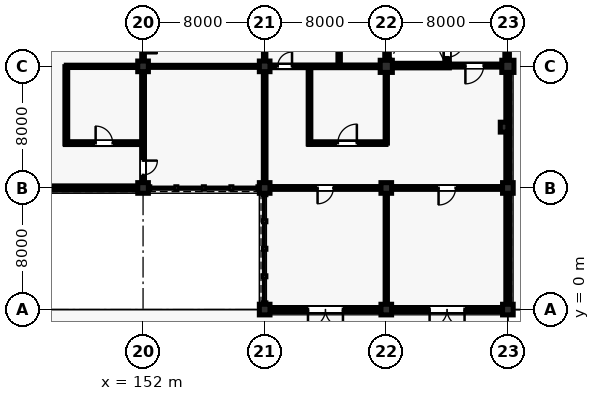
"""IFC4 building model, lengths in metres.
Left out: names, types, materials, properties, quantities, classifications, styles, units other than length and angle.
Written with IfcOpenShell. Run it as: python <this file> out.ifc"""

import sys

from ifc_helpers import new_model, si_unit, direction, frame, frame_2d, origin, origin_2d, place, context, subcontext, project, spatial, rectangle, extrude, element, fill, save


model = new_model("IFC4")
c1 = context("Model", 3, precision=1e-05, world=origin(), true_north=direction((0.0, 1.0)))
c2 = subcontext(c1, "Body", "Model", "MODEL_VIEW")
j1 = project(units=[si_unit("LENGTHUNIT", "METRE"), si_unit("PLANEANGLEUNIT", "RADIAN")], contexts=[c1])
p1 = place(None, origin())
s1 = spatial("IfcSite", under=j1, at=p1, CompositionType="ELEMENT")
p2 = place(p1, origin())
s2 = spatial("IfcBuilding", under=s1, at=p2, CompositionType="ELEMENT")
p3 = place(p2, origin())
s3 = spatial("IfcBuildingStorey", under=s2, at=p3, CompositionType="ELEMENT", Elevation=0.0)
for number, where, z_axis, x_axis in (
    (1, (152.0, 8.0, 0.0), (0.0, 0.0, 1.0), (1.0, 0.0, 0.0)),
    (2, (152.0, 16.0, 0.0), (0.0, 0.0, 1.0), (1.0, 0.0, 0.0)),
    (3, (160.0, 0.0, 0.0), (0.0, 0.0, 1.0), (1.0, 0.0, 0.0)),
    (4, (160.0, 8.0, 0.0), (0.0, 0.0, 1.0), (1.0, 0.0, 0.0)),
    (5, (160.0, 16.0, 0.0), (0.0, 0.0, 1.0), (1.0, 0.0, 0.0)),
    (6, (168.0, 0.0, 0.0), (0.0, 0.0, 1.0), (1.0, 0.0, 0.0)),
    (7, (168.0, 8.0, 0.0), (0.0, 0.0, 1.0), (1.0, 0.0, 0.0)),
):
    element("IfcColumn", number, at=place(p3, frame(where, z_axis=z_axis, x_axis=x_axis)), inside=s3, PredefinedType="COLUMN", context=c2, shape_type="SweptSolid", body=[
        extrude(rectangle(XDim=0.7, YDim=0.7, at=origin_2d()), origin(), (0.0, 0.0, 1.0), 5.28),
    ])
p4 = place(p3, frame((168.0, 16.0, 0.0), z_axis=(0.0, 0.0, 1.0), x_axis=(1.0, 0.0, 0.0)))
e8 = element("IfcColumn", 8, at=p4, inside=s3, PredefinedType="COLUMN", context=c2, shape_type="SweptSolid", body=[
    extrude(rectangle(XDim=0.8, YDim=0.8, at=origin_2d()), origin(), (0.0, 0.0, 1.0), 5.28),
])
for number, where, z_axis, x_axis in (
    (9, (176.0, 0.0, 0.0), (0.0, 0.0, 1.0), (1.0, 0.0, 0.0)),
    (10, (176.0, 8.0, 0.0), (0.0, 0.0, 1.0), (1.0, 0.0, 0.0)),
):
    element("IfcColumn", number, at=place(p3, frame(where, z_axis=z_axis, x_axis=x_axis)), inside=s3, PredefinedType="COLUMN", context=c2, shape_type="SweptSolid", body=[
        extrude(rectangle(XDim=0.7, YDim=0.7, at=origin_2d()), origin(), (0.0, 0.0, 1.0), 5.28),
    ])
p5 = place(p3, frame((176.0, 16.0, 0.0), z_axis=(0.0, 0.0, 1.0), x_axis=(1.0, 0.0, 0.0)))
e11 = element("IfcColumn", 11, at=p5, inside=s3, PredefinedType="COLUMN", context=c2, shape_type="SweptSolid", body=[
    extrude(rectangle(XDim=0.8, YDim=0.8, at=origin_2d()), origin(), (0.0, 0.0, 1.0), 5.28),
])
p6 = place(p3, frame((175.75, 12.0, 0.0), z_axis=(0.0, 0.0, 1.0), x_axis=(1.0, 0.0, 0.0)))
e12 = element("IfcColumn", 12, at=p6, inside=s3, PredefinedType="PILASTER", context=c2, shape_type="SweptSolid", body=[
    extrude(rectangle(XDim=0.5, YDim=0.65, at=origin_2d()), origin(), (0.0, 0.0, 1.0), 5.28),
])
p7 = place(p3, frame((144.335, 8.0, 0.0), z_axis=(0.0, 0.0, 1.0), x_axis=(1.0, 0.0, 0.0)))
e13 = element("IfcWall", 13, at=p7, inside=s3, PredefinedType="SOLIDWALL", context=c2, shape_type="SweptSolid", body=[
    extrude(rectangle(XDim=7.33, YDim=0.27, at=frame_2d((3.665, 0.0))), origin(), (0.0, 0.0, 1.0), 4.677),
])
p8 = place(p7, frame((0.644, 0.0, 0.95)))
e14 = element("IfcOpeningElement", 14, at=p8, cuts=e13, PredefinedType="OPENING", context=c2, shape_type="SweptSolid", body=[
    extrude(rectangle(XDim=1.35, YDim=1.9, at=frame_2d((0.675, 0.95))), frame((0.0, 0.145, 0.0), z_axis=(0.0, -1.0, 0.0), x_axis=(1.0, 0.0, 0.0)), (0.0, 0.0, 1.0), 0.29),
])
p9 = place(p7, frame((5.336, 0.0, 0.95)))
e15 = element("IfcOpeningElement", 15, at=p9, cuts=e13, PredefinedType="OPENING", context=c2, shape_type="SweptSolid", body=[
    extrude(rectangle(XDim=1.35, YDim=1.9, at=frame_2d((0.675, 0.95))), frame((0.0, 0.145, 0.0), z_axis=(0.0, -1.0, 0.0), x_axis=(1.0, 0.0, 0.0)), (0.0, 0.0, 1.0), 0.29),
])
p10 = place(p3, frame((160.335, 0.0, 0.0), z_axis=(0.0, 0.0, 1.0), x_axis=(1.0, 0.0, 0.0)))
e16 = element("IfcWall", 16, at=p10, inside=s3, PredefinedType="SOLIDWALL", context=c2, shape_type="SweptSolid", body=[
    extrude(rectangle(XDim=7.33, YDim=0.27, at=frame_2d((3.665, 0.0))), origin(), (0.0, 0.0, 1.0), 4.61),
])
p11 = place(p10, frame((2.515, 0.0, 0.0)))
e17 = element("IfcOpeningElement", 17, at=p11, cuts=e16, PredefinedType="OPENING", context=c2, shape_type="SweptSolid", body=[
    extrude(rectangle(XDim=2.3, YDim=2.55, at=frame_2d((1.15, 1.275))), frame((0.0, 0.145, 0.0), z_axis=(0.0, -1.0, 0.0), x_axis=(1.0, 0.0, 0.0)), (0.0, 0.0, 1.0), 0.29),
])
p12 = place(p3, frame((168.335, 0.0, 0.0), z_axis=(0.0, 0.0, 1.0), x_axis=(1.0, 0.0, 0.0)))
e18 = element("IfcWall", 18, at=p12, inside=s3, PredefinedType="SOLIDWALL", context=c2, shape_type="SweptSolid", body=[
    extrude(rectangle(XDim=7.33, YDim=0.27, at=frame_2d((3.665, 0.0))), origin(), (0.0, 0.0, 1.0), 4.674),
])
p13 = place(p12, frame((2.515, 0.0, 0.0)))
e19 = element("IfcOpeningElement", 19, at=p13, cuts=e18, PredefinedType="OPENING", context=c2, shape_type="SweptSolid", body=[
    extrude(rectangle(XDim=2.3, YDim=2.55, at=frame_2d((1.15, 1.275))), frame((0.0, 0.145, 0.0), z_axis=(0.0, -1.0, 0.0), x_axis=(1.0, 0.0, 0.0)), (0.0, 0.0, 1.0), 0.29),
])
p14 = place(p3, frame((176.0, 0.335, 0.0), z_axis=(0.0, 0.0, 1.0), x_axis=(0.0, 1.0, 0.0)))
e20 = element("IfcWall", 20, at=p14, inside=s3, PredefinedType="SOLIDWALL", context=c2, shape_type="SweptSolid", body=[
    extrude(rectangle(XDim=7.33, YDim=0.27, at=frame_2d((3.665, 0.0))), origin(), (0.0, 0.0, 1.0), 4.614),
])
p15 = place(p14, frame((2.59, 0.0, 0.9)))
e21 = element("IfcOpeningElement", 21, at=p15, cuts=e20, PredefinedType="OPENING", context=c2, shape_type="SweptSolid", body=[
    extrude(rectangle(XDim=2.15, YDim=2.8, at=frame_2d((1.075, 1.4))), frame((0.0, 0.145, 0.0), z_axis=(0.0, -1.0, 0.0), x_axis=(1.0, 0.0, 0.0)), (0.0, 0.0, 1.0), 0.29),
])
p16 = place(p3, frame((176.0, 8.335, 0.0), z_axis=(0.0, 0.0, 1.0), x_axis=(0.0, 1.0, 0.0)))
e22 = element("IfcWall", 22, at=p16, inside=s3, PredefinedType="SOLIDWALL", context=c2, shape_type="SweptSolid", body=[
    extrude(rectangle(XDim=7.28, YDim=0.27, at=frame_2d((3.64, 0.0))), origin(), (0.0, 0.0, 1.0), 4.677),
])
p17 = place(p16, frame((4.25, 0.0, 0.9)))
e23 = element("IfcOpeningElement", 23, at=p17, cuts=e22, PredefinedType="OPENING", context=c2, shape_type="SweptSolid", body=[
    extrude(rectangle(XDim=1.85, YDim=2.65, at=frame_2d((0.925, 1.325))), frame((0.0, 0.145, 0.0), z_axis=(0.0, -1.0, 0.0), x_axis=(1.0, 0.0, 0.0)), (0.0, 0.0, 1.0), 0.29),
])
for number, where, z_axis, x_axis in (
    (24, (168.05, 16.29, 0.0), (0.0, 0.0, 1.0), (0.0, 1.0, 0.0)),
    (25, (175.95, 16.29, 0.0), (0.0, 0.0, 1.0), (0.0, 1.0, 0.0)),
):
    element("IfcWall", number, at=place(p3, frame(where, z_axis=z_axis, x_axis=x_axis)), inside=s3, PredefinedType="SHEAR", context=c2, shape_type="SweptSolid", body=[
        extrude(rectangle(XDim=7.42, YDim=0.3, at=frame_2d((3.71, 0.0))), origin(), (0.0, 0.0, 1.0), 5.035),
    ])
p18 = place(p3, frame((168.29, 16.05, 0.0), z_axis=(0.0, 0.0, 1.0), x_axis=(1.0, 0.0, 0.0)))
e26 = element("IfcWall", 26, at=p18, inside=s3, PredefinedType="SHEAR", context=c2, shape_type="SweptSolid", body=[
    extrude(rectangle(XDim=3.86, YDim=0.3, at=frame_2d((1.93, 0.0))), origin(), (0.0, 0.0, 1.0), 5.035),
])
p19 = place(p3, frame((172.0, 16.05, 0.0), z_axis=(0.0, 0.0, 1.0), x_axis=(0.0, 1.0, 0.0)))
e27 = element("IfcWall", 27, at=p19, inside=s3, PredefinedType="SHEAR", context=c2, shape_type="SweptSolid", body=[
    extrude(rectangle(XDim=7.9, YDim=0.3, at=frame_2d((3.95, 0.0))), origin(), (0.0, 0.0, 1.0), 5.035),
])
p20 = place(p19, frame((0.55, 0.0, 0.0)))
e28 = element("IfcOpeningElement", 28, at=p20, cuts=e27, PredefinedType="OPENING", context=c2, shape_type="SweptSolid", body=[
    extrude(rectangle(XDim=1.1, YDim=2.15, at=frame_2d((0.55, 1.075))), frame((0.0, 0.16, 0.0), z_axis=(0.0, -1.0, 0.0), x_axis=(1.0, 0.0, 0.0)), (0.0, 0.0, 1.0), 0.32),
])
p21 = place(p3, frame((172.0, 16.05, 0.0), z_axis=(0.0, 0.0, 1.0), x_axis=(1.0, 0.0, 0.0)))
e29 = element("IfcWall", 29, at=p21, inside=s3, PredefinedType="PARTITIONING", context=c2, shape_type="SweptSolid", body=[
    extrude(rectangle(XDim=3.61, YDim=0.2, at=frame_2d((1.805, 0.0))), origin(), (0.0, 0.0, 1.0), 4.404),
])
p22 = place(p21, frame((1.205, 0.0, 0.0)))
e30 = element("IfcOpeningElement", 30, at=p22, cuts=e29, PredefinedType="OPENING", context=c2, shape_type="SweptSolid", body=[
    extrude(rectangle(XDim=1.2, YDim=2.15, at=frame_2d((0.6, 1.075))), frame((0.0, 0.11, 0.0), z_axis=(0.0, -1.0, 0.0), x_axis=(1.0, 0.0, 0.0)), (0.0, 0.0, 1.0), 0.22),
])
p23 = place(p3, frame((146.9, 10.95, 0.0), z_axis=(0.0, 0.0, 1.0), x_axis=(1.0, 0.0, 0.0)))
e31 = element("IfcWall", 31, at=p23, inside=s3, PredefinedType="PARTITIONING", context=c2, shape_type="SweptSolid", body=[
    extrude(rectangle(XDim=5.08, YDim=0.185, at=frame_2d((2.54, 0.0))), origin(), (0.0, 0.0, 1.0), 4.403),
])
p24 = place(p23, frame((1.98, 0.0, 0.0)))
e32 = element("IfcOpeningElement", 32, at=p24, cuts=e31, PredefinedType="OPENING", context=c2, shape_type="SweptSolid", body=[
    extrude(rectangle(XDim=1.12, YDim=2.22, at=frame_2d((0.56, 1.11))), frame((0.0, 0.103, 0.0), z_axis=(0.0, -1.0, 0.0), x_axis=(1.0, 0.0, 0.0)), (0.0, 0.0, 1.0), 0.205),
])
p25 = place(p3, frame((146.95, 10.9, 0.0), z_axis=(0.0, 0.0, 1.0), x_axis=(0.0, 1.0, 0.0)))
e33 = element("IfcWall", 33, at=p25, inside=s3, PredefinedType="PARTITIONING", context=c2, shape_type="SweptSolid", body=[
    extrude(rectangle(XDim=5.08, YDim=0.185, at=frame_2d((2.54, 0.0))), origin(), (0.0, 0.0, 1.0), 4.603),
])
p26 = place(p3, frame((146.95, 16.0, 0.0), z_axis=(0.0, 0.0, 1.0), x_axis=(1.0, 0.0, 0.0)))
e34 = element("IfcWall", 34, at=p26, inside=s3, PredefinedType="PARTITIONING", context=c2, shape_type="SweptSolid", body=[
    extrude(rectangle(XDim=4.69, YDim=0.15, at=frame_2d((2.345, 0.0))), origin(), (0.0, 0.0, 1.0), 4.603),
])
p27 = place(p3, frame((162.9, 10.95, 0.0), z_axis=(0.0, 0.0, 1.0), x_axis=(1.0, 0.0, 0.0)))
e35 = element("IfcWall", 35, at=p27, inside=s3, PredefinedType="PARTITIONING", context=c2, shape_type="SweptSolid", body=[
    extrude(rectangle(XDim=5.08, YDim=0.175, at=frame_2d((2.54, 0.0))), origin(), (0.0, 0.0, 1.0), 4.404),
])
p28 = place(p27, frame((1.915, 0.0, 0.0)))
e36 = element("IfcOpeningElement", 36, at=p28, cuts=e35, PredefinedType="OPENING", context=c2, shape_type="SweptSolid", body=[
    extrude(rectangle(XDim=1.25, YDim=2.18, at=frame_2d((0.625, 1.09))), frame((0.0, 0.097, 0.0), z_axis=(0.0, -1.0, 0.0), x_axis=(1.0, 0.0, 0.0)), (0.0, 0.0, 1.0), 0.195),
])
p29 = place(p3, frame((162.95, 10.9, 0.0), z_axis=(0.0, 0.0, 1.0), x_axis=(0.0, 1.0, 0.0)))
e37 = element("IfcWall", 37, at=p29, inside=s3, PredefinedType="PARTITIONING", context=c2, shape_type="SweptSolid", body=[
    extrude(rectangle(XDim=5.08, YDim=0.175, at=frame_2d((2.54, 0.0))), origin(), (0.0, 0.0, 1.0), 4.336),
])
p30 = place(p3, frame((168.0, 10.95, 0.0), z_axis=(0.0, 0.0, 1.0), x_axis=(0.0, 1.0, 0.0)))
e38 = element("IfcWall", 38, at=p30, inside=s3, PredefinedType="PARTITIONING", context=c2, shape_type="SweptSolid", body=[
    extrude(rectangle(XDim=4.64, YDim=0.15, at=frame_2d((2.32, 0.0))), origin(), (0.0, 0.0, 1.0), 4.404),
])
p31 = place(p3, frame((152.0, 8.34, 0.0), z_axis=(0.0, 0.0, 1.0), x_axis=(0.0, 1.0, 0.0)))
e39 = element("IfcWall", 39, at=p31, inside=s3, PredefinedType="PARTITIONING", context=c2, shape_type="SweptSolid", body=[
    extrude(rectangle(XDim=7.32, YDim=0.185, at=frame_2d((3.66, 0.0))), origin(), (0.0, 0.0, 1.0), 4.403),
])
p32 = place(p31, frame((0.52, 0.0, 0.0)))
e40 = element("IfcOpeningElement", 40, at=p32, cuts=e39, PredefinedType="OPENING", context=c2, shape_type="SweptSolid", body=[
    extrude(rectangle(XDim=0.94, YDim=2.12, at=frame_2d((0.47, 1.06))), frame((0.0, 0.103, 0.0), z_axis=(0.0, -1.0, 0.0), x_axis=(1.0, 0.0, 0.0)), (0.0, 0.0, 1.0), 0.205),
])
p33 = place(p3, frame((152.0, 16.34, 0.0), z_axis=(0.0, 0.0, 1.0), x_axis=(0.0, 1.0, 0.0)))
e41 = element("IfcWall", 41, at=p33, inside=s3, PredefinedType="PARTITIONING", context=c2, shape_type="SweptSolid", body=[
    extrude(rectangle(XDim=7.32, YDim=0.175, at=frame_2d((3.66, 0.0))), origin(), (0.0, 0.0, 1.0), 5.025),
])
p34 = place(p33, frame((0.52, 0.0, 0.0)))
e42 = element("IfcOpeningElement", 42, at=p34, cuts=e41, PredefinedType="OPENING", context=c2, shape_type="SweptSolid", body=[
    extrude(rectangle(XDim=0.94, YDim=2.12, at=frame_2d((0.47, 1.06))), frame((0.0, 0.097, 0.0), z_axis=(0.0, -1.0, 0.0), x_axis=(1.0, 0.0, 0.0)), (0.0, 0.0, 1.0), 0.195),
])
p35 = place(p3, frame((160.0, 8.34, 0.0), z_axis=(0.0, 0.0, 1.0), x_axis=(0.0, 1.0, 0.0)))
e43 = element("IfcWall", 43, at=p35, inside=s3, PredefinedType="PARTITIONING", context=c2, shape_type="SweptSolid", body=[
    extrude(rectangle(XDim=7.32, YDim=0.175, at=frame_2d((3.66, 0.0))), origin(), (0.0, 0.0, 1.0), 4.412),
])
p36 = place(p3, frame((152.34, 16.0, 0.0), z_axis=(0.0, 0.0, 1.0), x_axis=(1.0, 0.0, 0.0)))
e44 = element("IfcWall", 44, at=p36, inside=s3, PredefinedType="PARTITIONING", context=c2, shape_type="SweptSolid", body=[
    extrude(rectangle(XDim=7.32, YDim=0.135, at=frame_2d((3.66, 0.0))), origin(), (0.0, 0.0, 1.0), 4.667),
])
p37 = place(p3, frame((160.0, 16.34, 0.0), z_axis=(0.0, 0.0, 1.0), x_axis=(0.0, 1.0, 0.0)))
e45 = element("IfcWall", 45, at=p37, inside=s3, PredefinedType="PARTITIONING", context=c2, shape_type="SweptSolid", body=[
    extrude(rectangle(XDim=7.32, YDim=0.16, at=frame_2d((3.66, 0.0))), origin(), (0.0, 0.0, 1.0), 4.607),
])
p38 = place(p3, frame((168.0, 0.34, 0.0), z_axis=(0.0, 0.0, 1.0), x_axis=(0.0, 1.0, 0.0)))
e46 = element("IfcWall", 46, at=p38, inside=s3, PredefinedType="PARTITIONING", context=c2, shape_type="SweptSolid", body=[
    extrude(rectangle(XDim=7.32, YDim=0.15, at=frame_2d((3.66, 0.0))), origin(), (0.0, 0.0, 1.0), 4.412),
])
p39 = place(p3, frame((160.34, 8.0, 0.0), z_axis=(0.0, 0.0, 1.0), x_axis=(1.0, 0.0, 0.0)))
e47 = element("IfcWall", 47, at=p39, inside=s3, PredefinedType="PARTITIONING", context=c2, shape_type="SweptSolid", body=[
    extrude(rectangle(XDim=7.32, YDim=0.185, at=frame_2d((3.66, 0.0))), origin(), (0.0, 0.0, 1.0), 4.403),
])
p40 = place(p39, frame((3.14, 0.0, 0.0)))
e48 = element("IfcOpeningElement", 48, at=p40, cuts=e47, PredefinedType="OPENING", context=c2, shape_type="SweptSolid", body=[
    extrude(rectangle(XDim=1.04, YDim=2.18, at=frame_2d((0.52, 1.09))), frame((0.0, 0.103, 0.0), z_axis=(0.0, -1.0, 0.0), x_axis=(1.0, 0.0, 0.0)), (0.0, 0.0, 1.0), 0.205),
])
p41 = place(p3, frame((160.34, 16.0, 0.0), z_axis=(0.0, 0.0, 1.0), x_axis=(1.0, 0.0, 0.0)))
e49 = element("IfcWall", 49, at=p41, inside=s3, PredefinedType="PARTITIONING", context=c2, shape_type="SweptSolid", body=[
    extrude(rectangle(XDim=7.27, YDim=0.175, at=frame_2d((3.635, 0.0))), origin(), (0.0, 0.0, 1.0), 4.336),
])
p42 = place(p41, frame((0.52, 0.0, 0.0)))
e50 = element("IfcOpeningElement", 50, at=p42, cuts=e49, PredefinedType="OPENING", context=c2, shape_type="SweptSolid", body=[
    extrude(rectangle(XDim=0.94, YDim=2.12, at=frame_2d((0.47, 1.06))), frame((0.0, 0.097, 0.0), z_axis=(0.0, -1.0, 0.0), x_axis=(1.0, 0.0, 0.0)), (0.0, 0.0, 1.0), 0.195),
])
p43 = place(p3, frame((168.34, 8.0, 0.0), z_axis=(0.0, 0.0, 1.0), x_axis=(1.0, 0.0, 0.0)))
e51 = element("IfcWall", 51, at=p43, inside=s3, PredefinedType="PARTITIONING", context=c2, shape_type="SweptSolid", body=[
    extrude(rectangle(XDim=7.32, YDim=0.185, at=frame_2d((3.66, 0.0))), origin(), (0.0, 0.0, 1.0), 4.336),
])
p44 = place(p43, frame((3.1, 0.0, 0.0)))
e52 = element("IfcOpeningElement", 52, at=p44, cuts=e51, PredefinedType="OPENING", context=c2, shape_type="SweptSolid", body=[
    extrude(rectangle(XDim=1.12, YDim=2.22, at=frame_2d((0.56, 1.11))), frame((0.0, 0.103, 0.0), z_axis=(0.0, -1.0, 0.0), x_axis=(1.0, 0.0, 0.0)), (0.0, 0.0, 1.0), 0.205),
])
p45 = place(p3, frame((164.9, 16.02, 0.0), z_axis=(0.0, 0.0, 1.0), x_axis=(0.0, 1.0, 0.0)))
e53 = element("IfcWall", 53, at=p45, inside=s3, PredefinedType="PARTITIONING", context=c2, shape_type="SweptSolid", body=[
    extrude(rectangle(XDim=7.96, YDim=0.16, at=frame_2d((3.98, 0.0))), origin(), (0.0, 0.0, 1.0), 4.336),
])
p46 = place(p8, origin())
e54 = element("IfcWindow", 54, at=p46, inside=s3, PartitioningType="SINGLE_PANEL", PredefinedType="WINDOW", context=c2, shape_type="SweptSolid", body=[
    extrude(rectangle(XDim=1.35, YDim=1.9, at=frame_2d((0.675, 0.95))), frame((0.0, 0.03, 0.0), z_axis=(0.0, -1.0, 0.0), x_axis=(1.0, 0.0, 0.0)), (0.0, 0.0, 1.0), 0.06),
])
fill(e14, e54)
p47 = place(p9, origin())
e55 = element("IfcWindow", 55, at=p47, inside=s3, PartitioningType="SINGLE_PANEL", PredefinedType="WINDOW", context=c2, shape_type="SweptSolid", body=[
    extrude(rectangle(XDim=1.35, YDim=1.9, at=frame_2d((0.675, 0.95))), frame((0.0, 0.03, 0.0), z_axis=(0.0, -1.0, 0.0), x_axis=(1.0, 0.0, 0.0)), (0.0, 0.0, 1.0), 0.06),
])
fill(e15, e55)
p48 = place(p11, frame((2.3, 0.0, 0.0), z_axis=(0.0, 0.0, 1.0), x_axis=(-1.0, 0.0, 0.0)))
e56 = element("IfcDoor", 56, at=p48, inside=s3, OperationType="DOUBLE_DOOR_SINGLE_SWING", PredefinedType="DOOR", context=c2, shape_type="SweptSolid", body=[
    extrude(rectangle(XDim=2.3, YDim=2.55, at=frame_2d((1.15, 1.275))), frame((0.0, 0.025, 0.0), z_axis=(0.0, -1.0, 0.0), x_axis=(1.0, 0.0, 0.0)), (0.0, 0.0, 1.0), 0.05),
])
fill(e17, e56)
p49 = place(p13, frame((2.3, 0.0, 0.0), z_axis=(0.0, 0.0, 1.0), x_axis=(-1.0, 0.0, 0.0)))
e57 = element("IfcDoor", 57, at=p49, inside=s3, OperationType="DOUBLE_DOOR_SINGLE_SWING", PredefinedType="DOOR", context=c2, shape_type="SweptSolid", body=[
    extrude(rectangle(XDim=2.3, YDim=2.55, at=frame_2d((1.15, 1.275))), frame((0.0, 0.025, 0.0), z_axis=(0.0, -1.0, 0.0), x_axis=(1.0, 0.0, 0.0)), (0.0, 0.0, 1.0), 0.05),
])
fill(e19, e57)
p50 = place(p15, origin())
e58 = element("IfcWindow", 58, at=p50, inside=s3, PartitioningType="SINGLE_PANEL", PredefinedType="WINDOW", context=c2, shape_type="SweptSolid", body=[
    extrude(rectangle(XDim=2.15, YDim=2.8, at=frame_2d((1.075, 1.4))), frame((0.0, 0.03, 0.0), z_axis=(0.0, -1.0, 0.0), x_axis=(1.0, 0.0, 0.0)), (0.0, 0.0, 1.0), 0.06),
])
fill(e21, e58)
p51 = place(p17, origin())
e59 = element("IfcWindow", 59, at=p51, inside=s3, PartitioningType="SINGLE_PANEL", PredefinedType="WINDOW", context=c2, shape_type="SweptSolid", body=[
    extrude(rectangle(XDim=1.85, YDim=2.65, at=frame_2d((0.925, 1.325))), frame((0.0, 0.03, 0.0), z_axis=(0.0, -1.0, 0.0), x_axis=(1.0, 0.0, 0.0)), (0.0, 0.0, 1.0), 0.06),
])
fill(e23, e59)
p52 = place(p20, frame((1.1, 0.0, 0.0), z_axis=(0.0, 0.0, 1.0), x_axis=(-1.0, 0.0, 0.0)))
e60 = element("IfcDoor", 60, at=p52, inside=s3, OperationType="SINGLE_SWING_RIGHT", PredefinedType="DOOR", context=c2, shape_type="SweptSolid", body=[
    extrude(rectangle(XDim=1.1, YDim=2.15, at=frame_2d((0.55, 1.075))), frame((0.0, 0.025, 0.0), z_axis=(0.0, -1.0, 0.0), x_axis=(1.0, 0.0, 0.0)), (0.0, 0.0, 1.0), 0.05),
])
fill(e28, e60)
p53 = place(p22, frame((1.2, 0.0, 0.0), z_axis=(0.0, 0.0, 1.0), x_axis=(-1.0, 0.0, 0.0)))
e61 = element("IfcDoor", 61, at=p53, inside=s3, OperationType="SINGLE_SWING_LEFT", PredefinedType="DOOR", context=c2, shape_type="SweptSolid", body=[
    extrude(rectangle(XDim=1.2, YDim=2.15, at=frame_2d((0.6, 1.075))), frame((0.0, 0.025, 0.0), z_axis=(0.0, -1.0, 0.0), x_axis=(1.0, 0.0, 0.0)), (0.0, 0.0, 1.0), 0.05),
])
fill(e30, e61)
p54 = place(p24, origin())
e62 = element("IfcDoor", 62, at=p54, inside=s3, OperationType="SINGLE_SWING_LEFT", PredefinedType="DOOR", context=c2, shape_type="SweptSolid", body=[
    extrude(rectangle(XDim=1.12, YDim=2.22, at=frame_2d((0.56, 1.11))), frame((0.0, 0.025, 0.0), z_axis=(0.0, -1.0, 0.0), x_axis=(1.0, 0.0, 0.0)), (0.0, 0.0, 1.0), 0.05),
])
fill(e32, e62)
p55 = place(p28, origin())
e63 = element("IfcDoor", 63, at=p55, inside=s3, OperationType="SINGLE_SWING_RIGHT", PredefinedType="DOOR", context=c2, shape_type="SweptSolid", body=[
    extrude(rectangle(XDim=1.25, YDim=2.18, at=frame_2d((0.625, 1.09))), frame((0.0, 0.025, 0.0), z_axis=(0.0, -1.0, 0.0), x_axis=(1.0, 0.0, 0.0)), (0.0, 0.0, 1.0), 0.05),
])
fill(e36, e63)
p56 = place(p32, frame((0.94, 0.0, 0.0), z_axis=(0.0, 0.0, 1.0), x_axis=(-1.0, 0.0, 0.0)))
e64 = element("IfcDoor", 64, at=p56, inside=s3, OperationType="SINGLE_SWING_RIGHT", PredefinedType="DOOR", context=c2, shape_type="SweptSolid", body=[
    extrude(rectangle(XDim=0.94, YDim=2.12, at=frame_2d((0.47, 1.06))), frame((0.0, 0.025, 0.0), z_axis=(0.0, -1.0, 0.0), x_axis=(1.0, 0.0, 0.0)), (0.0, 0.0, 1.0), 0.05),
])
fill(e40, e64)
p57 = place(p34, frame((0.94, 0.0, 0.0), z_axis=(0.0, 0.0, 1.0), x_axis=(-1.0, 0.0, 0.0)))
e65 = element("IfcDoor", 65, at=p57, inside=s3, OperationType="SINGLE_SWING_LEFT", PredefinedType="DOOR", context=c2, shape_type="SweptSolid", body=[
    extrude(rectangle(XDim=0.94, YDim=2.12, at=frame_2d((0.47, 1.06))), frame((0.0, 0.025, 0.0), z_axis=(0.0, -1.0, 0.0), x_axis=(1.0, 0.0, 0.0)), (0.0, 0.0, 1.0), 0.05),
])
fill(e42, e65)
p58 = place(p40, frame((1.04, 0.0, 0.0), z_axis=(0.0, 0.0, 1.0), x_axis=(-1.0, 0.0, 0.0)))
e66 = element("IfcDoor", 66, at=p58, inside=s3, OperationType="SINGLE_SWING_LEFT", PredefinedType="DOOR", context=c2, shape_type="SweptSolid", body=[
    extrude(rectangle(XDim=1.04, YDim=2.18, at=frame_2d((0.52, 1.09))), frame((0.0, 0.025, 0.0), z_axis=(0.0, -1.0, 0.0), x_axis=(1.0, 0.0, 0.0)), (0.0, 0.0, 1.0), 0.05),
])
fill(e48, e66)
p59 = place(p42, origin())
e67 = element("IfcDoor", 67, at=p59, inside=s3, OperationType="SINGLE_SWING_RIGHT", PredefinedType="DOOR", context=c2, shape_type="SweptSolid", body=[
    extrude(rectangle(XDim=0.94, YDim=2.12, at=frame_2d((0.47, 1.06))), frame((0.0, 0.025, 0.0), z_axis=(0.0, -1.0, 0.0), x_axis=(1.0, 0.0, 0.0)), (0.0, 0.0, 1.0), 0.05),
])
fill(e50, e67)
p60 = place(p44, frame((1.12, 0.0, 0.0), z_axis=(0.0, 0.0, 1.0), x_axis=(-1.0, 0.0, 0.0)))
e68 = element("IfcDoor", 68, at=p60, inside=s3, OperationType="SINGLE_SWING_LEFT", PredefinedType="DOOR", context=c2, shape_type="SweptSolid", body=[
    extrude(rectangle(XDim=1.12, YDim=2.22, at=frame_2d((0.56, 1.11))), frame((0.0, 0.025, 0.0), z_axis=(0.0, -1.0, 0.0), x_axis=(1.0, 0.0, 0.0)), (0.0, 0.0, 1.0), 0.05),
])
fill(e52, e68)
save(model, sys.argv[1])
